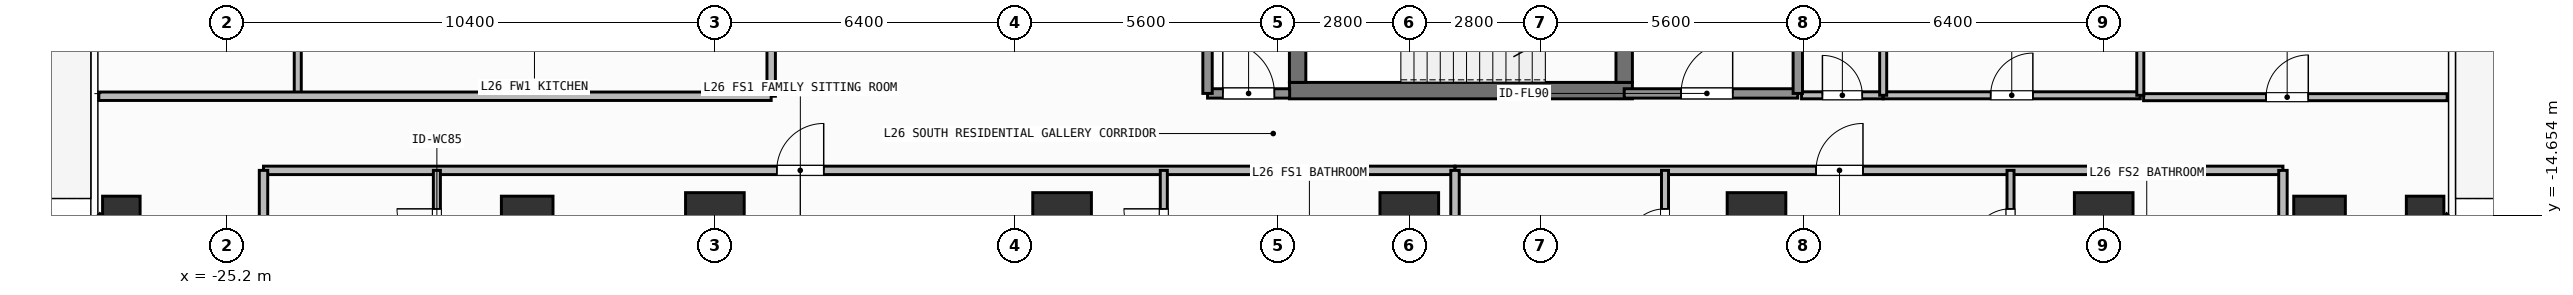
"""IFC4 building model, lengths in metres.
Left out: names, types, materials, properties, quantities, classifications, styles, units other than length and angle.
Written with IfcOpenShell. Run it as: python <this file> out.ifc"""

import sys

from ifc_helpers import new_model, si_unit, direction, frame, frame_2d, origin, origin_2d, place, context, subcontext, project, spatial, rectangle, hollow_rectangle, extrude, element, fill, save


model = new_model("IFC4")
c1 = context("Model", 3, precision=1e-05, world=origin(), true_north=direction((0.0, 1.0)))
c2 = subcontext(c1, "Body", "Model", "MODEL_VIEW")
j1 = project(units=[si_unit("LENGTHUNIT", "METRE"), si_unit("PLANEANGLEUNIT", "RADIAN")], contexts=[c1])
p1 = place(None, origin())
s1 = spatial("IfcSite", under=j1, at=p1, CompositionType="ELEMENT")
p2 = place(p1, origin())
s2 = spatial("IfcBuilding", under=s1, at=p2, CompositionType="ELEMENT")
p3 = place(p2, frame((0.0, 0.0, 104.7)))
s3 = spatial("IfcBuildingStorey", under=s2, at=p3, CompositionType="ELEMENT", Elevation=104.7)
p4 = place(p3, frame((-2.555, -12.0, 0.0), z_axis=(0.0, 0.0, 1.0), x_axis=(1.0, 0.0, 0.0)))
e1 = element("IfcWall", 1, at=p4, inside=s3, PredefinedType="SHEAR", context=c2, shape_type="SweptSolid", body=[
    extrude(rectangle(XDim=7.31, YDim=0.35, at=frame_2d((3.655, 0.0))), origin(), (0.0, 0.0, 1.0), 3.9),
])
p5 = place(p3, frame((-2.38, -11.825, 0.0), z_axis=(0.0, 0.0, 1.0), x_axis=(0.0, 1.0, 0.0)))
e2 = element("IfcWall", 2, at=p5, inside=s3, PredefinedType="SHEAR", context=c2, shape_type="SweptSolid", body=[
    extrude(rectangle(XDim=2.925, YDim=0.35, at=frame_2d((1.462, 0.0))), origin(), (0.0, 0.0, 1.0), 3.9),
])
p6 = place(p3, frame((4.58, -8.9, 0.0), z_axis=(0.0, 0.0, 1.0), x_axis=(0.0, -1.0, 0.0)))
e3 = element("IfcWall", 3, at=p6, inside=s3, PredefinedType="SHEAR", context=c2, shape_type="SweptSolid", body=[
    extrude(rectangle(XDim=2.925, YDim=0.35, at=frame_2d((1.462, 0.0))), origin(), (0.0, 0.0, 1.0), 3.9),
])
p7 = place(p6, frame((0.913, 0.0, 0.0)))
e4 = element("IfcOpeningElement", 4, at=p7, cuts=e3, PredefinedType="OPENING", context=c2, shape_type="SweptSolid", body=[
    extrude(rectangle(XDim=1.1, YDim=2.15, at=frame_2d((0.55, 1.075))), frame((0.0, 0.185, 0.0), z_axis=(0.0, -1.0, 0.0), x_axis=(1.0, 0.0, 0.0)), (0.0, 0.0, 1.0), 0.37),
])
for number, where, z_axis, x_axis in (
    (5, (-14.8, -14.8, 0.0), (0.0, 0.0, 1.0), (1.0, 0.0, 0.0)),
    (6, (-7.4, -14.8, 0.0), (0.0, 0.0, 1.0), (1.0, 0.0, 0.0)),
    (7, (0.0, -14.8, 0.0), (0.0, 0.0, 1.0), (1.0, 0.0, 0.0)),
    (8, (7.4, -14.8, 0.0), (0.0, 0.0, 1.0), (1.0, 0.0, 0.0)),
    (9, (14.8, -14.8, 0.0), (0.0, 0.0, 1.0), (1.0, 0.0, 0.0)),
):
    element("IfcColumn", number, at=place(p3, frame(where, z_axis=z_axis, x_axis=x_axis)), inside=s3, PredefinedType="COLUMN", context=c2, shape_type="SweptSolid", body=[
        extrude(rectangle(XDim=1.25, YDim=1.25, at=origin_2d()), origin(), (0.0, 0.0, 1.0), 3.9),
    ])
for number, where, z_axis, x_axis in (
    (10, (-18.8, -14.8, 0.0), (0.0, 0.0, 1.0), (1.0, 0.0, 0.0)),
    (11, (19.4, -14.8, 0.0), (0.0, 0.0, 1.0), (1.0, 0.0, 0.0)),
):
    element("IfcColumn", number, at=place(p3, frame(where, z_axis=z_axis, x_axis=x_axis)), inside=s3, PredefinedType="COLUMN", context=c2, shape_type="SweptSolid", body=[
        extrude(rectangle(XDim=1.1, YDim=1.1, at=origin_2d()), origin(), (0.0, 0.0, 1.0), 3.9),
    ])
for number, where, z_axis, x_axis in (
    (12, (-27.45, -14.65, 0.0), (0.0, 0.0, 1.0), (1.0, 0.0, 0.0)),
    (13, (21.65, -14.65, 0.0), (0.0, 0.0, 1.0), (1.0, 0.0, 0.0)),
):
    element("IfcColumn", number, at=place(p3, frame(where, z_axis=z_axis, x_axis=x_axis)), inside=s3, PredefinedType="COLUMN", context=c2, shape_type="SweptSolid", body=[
        extrude(hollow_rectangle(XDim=0.8, YDim=0.8, WallThickness=0.036, at=origin_2d()), origin(), (0.0, 0.0, 1.0), 3.9),
    ])
p8 = place(p3, frame((-23.408, -19.292, 0.0), z_axis=(0.0, 0.0, 1.0), x_axis=(-0.707087954376, 0.707125607496, 0.0)))
e14 = element("IfcWall", 14, at=p8, inside=s3, PredefinedType="SOLIDWALL", context=c2, shape_type="SweptSolid", body=[
    extrude(rectangle(XDim=6.484, YDim=0.24, at=frame_2d((3.242, 0.0))), origin(), (0.0, 0.0, 1.0), 3.62),
])
p9 = place(p8, frame((2.492, 0.0, 0.8)))
e15 = element("IfcOpeningElement", 15, at=p9, cuts=e14, PredefinedType="OPENING", context=c2, shape_type="SweptSolid", body=[
    extrude(rectangle(XDim=1.5, YDim=1.85, at=frame_2d((0.75, 0.925))), frame((0.0, 0.13, 0.0), z_axis=(0.0, -1.0, 0.0), x_axis=(1.0, 0.0, 0.0)), (0.0, 0.0, 1.0), 0.26),
])
p10 = place(p3, frame((22.192, -14.708, 0.0), z_axis=(0.0, 0.0, 1.0), x_axis=(-0.707087954376, -0.707125607496, 0.0)))
e16 = element("IfcWall", 16, at=p10, inside=s3, PredefinedType="SOLIDWALL", context=c2, shape_type="SweptSolid", body=[
    extrude(rectangle(XDim=6.484, YDim=0.24, at=frame_2d((3.242, 0.0))), origin(), (0.0, 0.0, 1.0), 3.62),
])
p11 = place(p3, frame((4.58, -12.06, 0.0), z_axis=(0.0, 0.0, 1.0), x_axis=(1.0, 0.0, 0.0)))
e17 = element("IfcWall", 17, at=p11, inside=s3, PredefinedType="SOLIDWALL", context=c2, shape_type="SweptSolid", body=[
    extrude(rectangle(XDim=3.7, YDim=0.2, at=frame_2d((1.85, 0.0))), origin(), (0.0, 0.0, 1.0), 3.62),
])
p12 = place(p11, frame((1.212, 0.0, 0.0)))
e18 = element("IfcOpeningElement", 18, at=p12, cuts=e17, PredefinedType="OPENING", context=c2, shape_type="SweptSolid", body=[
    extrude(rectangle(XDim=1.1, YDim=2.15, at=frame_2d((0.55, 1.075))), frame((0.0, 0.11, 0.0), z_axis=(0.0, -1.0, 0.0), x_axis=(1.0, 0.0, 0.0)), (0.0, 0.0, 1.0), 0.22),
])
p13 = place(p3, frame((-4.3, -12.06, 0.0), z_axis=(0.0, 0.0, 1.0), x_axis=(1.0, 0.0, 0.0)))
e19 = element("IfcWall", 19, at=p13, inside=s3, PredefinedType="SOLIDWALL", context=c2, shape_type="SweptSolid", body=[
    extrude(rectangle(XDim=1.75, YDim=0.2, at=frame_2d((0.875, 0.0))), origin(), (0.0, 0.0, 1.0), 3.62),
])
p14 = place(p13, frame((0.325, 0.0, 0.0)))
e20 = element("IfcOpeningElement", 20, at=p14, cuts=e19, PredefinedType="OPENING", context=c2, shape_type="SweptSolid", body=[
    extrude(rectangle(XDim=1.1, YDim=2.15, at=frame_2d((0.55, 1.075))), frame((0.0, 0.11, 0.0), z_axis=(0.0, -1.0, 0.0), x_axis=(1.0, 0.0, 0.0)), (0.0, 0.0, 1.0), 0.22),
])
p15 = place(p3, frame((8.36, -12.1, 0.0), z_axis=(0.0, 0.0, 1.0), x_axis=(1.0, 0.0, 0.0)))
e21 = element("IfcWall", 21, at=p15, inside=s3, PredefinedType="PARTITIONING", context=c2, shape_type="SweptSolid", body=[
    extrude(rectangle(XDim=1.74, YDim=0.15, at=frame_2d((0.87, 0.0))), origin(), (0.0, 0.0, 1.0), 3.62),
])
p16 = place(p15, frame((0.445, 0.0, 0.0)))
e22 = element("IfcOpeningElement", 22, at=p16, cuts=e21, PredefinedType="OPENING", context=c2, shape_type="SweptSolid", body=[
    extrude(rectangle(XDim=0.85, YDim=2.1, at=frame_2d((0.425, 1.05))), frame((0.0, 0.085, 0.0), z_axis=(0.0, -1.0, 0.0), x_axis=(1.0, 0.0, 0.0)), (0.0, 0.0, 1.0), 0.17),
])
p17 = place(p3, frame((10.1, -12.1, 0.0), z_axis=(0.0, 0.0, 1.0), x_axis=(1.0, 0.0, 0.0)))
e23 = element("IfcWall", 23, at=p17, inside=s3, PredefinedType="PARTITIONING", context=c2, shape_type="SweptSolid", body=[
    extrude(rectangle(XDim=5.48, YDim=0.15, at=frame_2d((2.74, 0.0))), origin(), (0.0, 0.0, 1.0), 3.62),
])
p18 = place(p17, frame((2.29, 0.0, 0.0)))
e24 = element("IfcOpeningElement", 24, at=p18, cuts=e23, PredefinedType="OPENING", context=c2, shape_type="SweptSolid", body=[
    extrude(rectangle(XDim=0.9, YDim=2.1, at=frame_2d((0.45, 1.05))), frame((0.0, 0.085, 0.0), z_axis=(0.0, -1.0, 0.0), x_axis=(1.0, 0.0, 0.0)), (0.0, 0.0, 1.0), 0.17),
])
p19 = place(p3, frame((-24.42, -13.7, 0.0), z_axis=(0.0, 0.0, 1.0), x_axis=(1.0, 0.0, 0.0)))
e25 = element("IfcWall", 25, at=p19, inside=s3, PredefinedType="PARTITIONING", context=c2, shape_type="SweptSolid", body=[
    extrude(rectangle(XDim=25.394, YDim=0.18, at=frame_2d((12.697, 0.0))), origin(), (0.0, 0.0, 1.0), 3.62),
])
p20 = place(p19, frame((10.939, 0.0, 0.0)))
e26 = element("IfcOpeningElement", 26, at=p20, cuts=e25, PredefinedType="OPENING", context=c2, shape_type="SweptSolid", body=[
    extrude(rectangle(XDim=1.0, YDim=2.2, at=frame_2d((0.5, 1.1))), frame((0.0, 0.1, 0.0), z_axis=(0.0, -1.0, 0.0), x_axis=(1.0, 0.0, 0.0)), (0.0, 0.0, 1.0), 0.2),
])
p21 = place(p3, frame((-20.725, -16.19, 0.0), z_axis=(0.0, 0.0, 1.0), x_axis=(0.0, 1.0, 0.0)))
e27 = element("IfcWall", 27, at=p21, inside=s3, PredefinedType="PARTITIONING", context=c2, shape_type="SweptSolid", body=[
    extrude(rectangle(XDim=2.49, YDim=0.15, at=frame_2d((1.245, 0.0))), origin(), (0.0, 0.0, 1.0), 3.62),
])
p22 = place(p21, frame((0.82, 0.0, 0.0)))
e28 = element("IfcOpeningElement", 28, at=p22, cuts=e27, PredefinedType="OPENING", context=c2, shape_type="SweptSolid", body=[
    extrude(rectangle(XDim=0.85, YDim=2.1, at=frame_2d((0.425, 1.05))), frame((0.0, 0.085, 0.0), z_axis=(0.0, -1.0, 0.0), x_axis=(1.0, 0.0, 0.0)), (0.0, 0.0, 1.0), 0.17),
])
p23 = place(p3, frame((-5.232, -16.19, 0.0), z_axis=(0.0, 0.0, 1.0), x_axis=(0.0, 1.0, 0.0)))
e29 = element("IfcWall", 29, at=p23, inside=s3, PredefinedType="PARTITIONING", context=c2, shape_type="SweptSolid", body=[
    extrude(rectangle(XDim=2.49, YDim=0.15, at=frame_2d((1.245, 0.0))), origin(), (0.0, 0.0, 1.0), 3.62),
])
p24 = place(p23, frame((0.82, 0.0, 0.0)))
e30 = element("IfcOpeningElement", 30, at=p24, cuts=e29, PredefinedType="OPENING", context=c2, shape_type="SweptSolid", body=[
    extrude(rectangle(XDim=0.85, YDim=2.1, at=frame_2d((0.425, 1.05))), frame((0.0, 0.085, 0.0), z_axis=(0.0, -1.0, 0.0), x_axis=(1.0, 0.0, 0.0)), (0.0, 0.0, 1.0), 0.17),
])
p25 = place(p3, frame((0.974, -13.7, 0.0), z_axis=(0.0, 0.0, 1.0), x_axis=(1.0, 0.0, 0.0)))
e31 = element("IfcWall", 31, at=p25, inside=s3, PredefinedType="PARTITIONING", context=c2, shape_type="SweptSolid", body=[
    extrude(rectangle(XDim=17.646, YDim=0.18, at=frame_2d((8.823, 0.0))), origin(), (0.0, 0.0, 1.0), 3.62),
])
p26 = place(p25, frame((7.695, 0.0, 0.0)))
e32 = element("IfcOpeningElement", 32, at=p26, cuts=e31, PredefinedType="OPENING", context=c2, shape_type="SweptSolid", body=[
    extrude(rectangle(XDim=1.0, YDim=2.2, at=frame_2d((0.5, 1.1))), frame((0.0, 0.1, 0.0), z_axis=(0.0, -1.0, 0.0), x_axis=(1.0, 0.0, 0.0)), (0.0, 0.0, 1.0), 0.2),
])
p27 = place(p3, frame((5.45, -16.19, 0.0), z_axis=(0.0, 0.0, 1.0), x_axis=(0.0, 1.0, 0.0)))
e33 = element("IfcWall", 33, at=p27, inside=s3, PredefinedType="PARTITIONING", context=c2, shape_type="SweptSolid", body=[
    extrude(rectangle(XDim=2.49, YDim=0.15, at=frame_2d((1.245, 0.0))), origin(), (0.0, 0.0, 1.0), 3.62),
])
p28 = place(p27, frame((0.82, 0.0, 0.0)))
e34 = element("IfcOpeningElement", 34, at=p28, cuts=e33, PredefinedType="OPENING", context=c2, shape_type="SweptSolid", body=[
    extrude(rectangle(XDim=0.85, YDim=2.1, at=frame_2d((0.425, 1.05))), frame((0.0, 0.085, 0.0), z_axis=(0.0, -1.0, 0.0), x_axis=(1.0, 0.0, 0.0)), (0.0, 0.0, 1.0), 0.17),
])
p29 = place(p3, frame((12.814, -16.19, 0.0), z_axis=(0.0, 0.0, 1.0), x_axis=(0.0, 1.0, 0.0)))
e35 = element("IfcWall", 35, at=p29, inside=s3, PredefinedType="PARTITIONING", context=c2, shape_type="SweptSolid", body=[
    extrude(rectangle(XDim=2.49, YDim=0.15, at=frame_2d((1.245, 0.0))), origin(), (0.0, 0.0, 1.0), 3.62),
])
p30 = place(p29, frame((0.82, 0.0, 0.0)))
e36 = element("IfcOpeningElement", 36, at=p30, cuts=e35, PredefinedType="OPENING", context=c2, shape_type="SweptSolid", body=[
    extrude(rectangle(XDim=0.85, YDim=2.1, at=frame_2d((0.425, 1.05))), frame((0.0, 0.085, 0.0), z_axis=(0.0, -1.0, 0.0), x_axis=(1.0, 0.0, 0.0)), (0.0, 0.0, 1.0), 0.17),
])
p31 = place(p3, frame((-13.6, -12.12, 0.0), z_axis=(0.0, 0.0, 1.0), x_axis=(0.0, 1.0, 0.0)))
e37 = element("IfcWall", 37, at=p31, inside=s3, PredefinedType="PARTITIONING", context=c2, shape_type="SweptSolid", body=[
    extrude(rectangle(XDim=10.52, YDim=0.18, at=frame_2d((5.26, 0.0))), origin(), (0.0, 0.0, 1.0), 3.62),
])
p32 = place(p31, frame((5.468, 0.0, 0.0)))
e38 = element("IfcOpeningElement", 38, at=p32, cuts=e37, PredefinedType="OPENING", context=c2, shape_type="SweptSolid", body=[
    extrude(rectangle(XDim=1.0, YDim=2.2, at=frame_2d((0.5, 1.1))), frame((0.0, 0.1, 0.0), z_axis=(0.0, -1.0, 0.0), x_axis=(1.0, 0.0, 0.0)), (0.0, 0.0, 1.0), 0.2),
])
p33 = place(p3, frame((15.65, -12.14, 0.0), z_axis=(0.0, 0.0, 1.0), x_axis=(1.0, 0.0, 0.0)))
e39 = element("IfcWall", 39, at=p33, inside=s3, PredefinedType="PARTITIONING", context=c2, shape_type="SweptSolid", body=[
    extrude(rectangle(XDim=6.47, YDim=0.15, at=frame_2d((3.235, 0.0))), origin(), (0.0, 0.0, 1.0), 3.62),
])
p34 = place(p33, frame((2.61, 0.0, 0.0)))
e40 = element("IfcOpeningElement", 40, at=p34, cuts=e39, PredefinedType="OPENING", context=c2, shape_type="SweptSolid", body=[
    extrude(rectangle(XDim=0.9, YDim=2.1, at=frame_2d((0.45, 1.05))), frame((0.0, 0.085, 0.0), z_axis=(0.0, -1.0, 0.0), x_axis=(1.0, 0.0, 0.0)), (0.0, 0.0, 1.0), 0.17),
])
for number, where, z_axis, x_axis in (
    (41, (8.28, -12.06, 0.0), (0.0, 0.0, 1.0), (0.0, 1.0, 0.0)),
    (42, (-4.3, -12.06, 0.0), (0.0, 0.0, 1.0), (0.0, 1.0, 0.0)),
):
    element("IfcWall", number, at=place(p3, frame(where, z_axis=z_axis, x_axis=x_axis)), inside=s3, PredefinedType="SOLIDWALL", context=c2, shape_type="SweptSolid", body=[
        extrude(rectangle(XDim=3.185, YDim=0.2, at=frame_2d((1.593, 0.0))), origin(), (0.0, 0.0, 1.0), 3.62),
    ])
p35 = place(p3, frame((10.1, -12.1, 0.0), z_axis=(0.0, 0.0, 1.0), x_axis=(0.0, 1.0, 0.0)))
e43 = element("IfcWall", 43, at=p35, inside=s3, PredefinedType="PARTITIONING", context=c2, shape_type="SweptSolid", body=[
    extrude(rectangle(XDim=2.35, YDim=0.15, at=frame_2d((1.175, 0.0))), origin(), (0.0, 0.0, 1.0), 3.62),
])
p36 = place(p3, frame((15.58, -12.1, 0.0), z_axis=(0.0, 0.0, 1.0), x_axis=(0.0, 1.0, 0.0)))
e44 = element("IfcWall", 44, at=p36, inside=s3, PredefinedType="PARTITIONING", context=c2, shape_type="SweptSolid", body=[
    extrude(rectangle(XDim=6.25, YDim=0.15, at=frame_2d((3.125, 0.0))), origin(), (0.0, 0.0, 1.0), 3.62),
])
for number, where, z_axis, x_axis in (
    (45, (-24.42, -18.11, 0.0), (0.0, 0.0, 1.0), (0.0, 1.0, 0.0)),
    (46, (18.62, -18.11, 0.0), (0.0, 0.0, 1.0), (0.0, 1.0, 0.0)),
):
    element("IfcWall", number, at=place(p3, frame(where, z_axis=z_axis, x_axis=x_axis)), inside=s3, PredefinedType="PARTITIONING", context=c2, shape_type="SweptSolid", body=[
        extrude(rectangle(XDim=4.41, YDim=0.18, at=frame_2d((2.205, 0.0))), origin(), (0.0, 0.0, 1.0), 3.62),
    ])
p37 = place(p3, frame((0.974, -19.23, 0.0), z_axis=(0.0, 0.0, 1.0), x_axis=(0.0, 1.0, 0.0)))
e47 = element("IfcWall", 47, at=p37, inside=s3, PredefinedType="PARTITIONING", context=c2, shape_type="SweptSolid", body=[
    extrude(rectangle(XDim=5.53, YDim=0.18, at=frame_2d((2.765, 0.0))), origin(), (0.0, 0.0, 1.0), 3.62),
])
p38 = place(p3, frame((-23.69, -12.12, 0.0), z_axis=(0.0, 0.0, 1.0), x_axis=(0.0, 1.0, 0.0)))
e48 = element("IfcWall", 48, at=p38, inside=s3, PredefinedType="PARTITIONING", context=c2, shape_type="SweptSolid", body=[
    extrude(rectangle(XDim=2.8, YDim=0.15, at=frame_2d((1.4, 0.0))), origin(), (0.0, 0.0, 1.0), 3.62),
])
p39 = place(p3, frame((-27.93, -12.12, 0.0), z_axis=(0.0, 0.0, 1.0), x_axis=(1.0, 0.0, 0.0)))
e49 = element("IfcWall", 49, at=p39, inside=s3, PredefinedType="PARTITIONING", context=c2, shape_type="SweptSolid", body=[
    extrude(rectangle(XDim=14.33, YDim=0.18, at=frame_2d((7.165, 0.0))), origin(), (0.0, 0.0, 1.0), 3.62),
])
p40 = place(p12, origin())
e50 = element("IfcDoor", 50, at=p40, inside=s3, OperationType="SINGLE_SWING_RIGHT", PredefinedType="DOOR", context=c2, shape_type="SweptSolid", body=[
    extrude(rectangle(XDim=1.1, YDim=2.15, at=frame_2d((0.55, 1.075))), frame((0.0, 0.025, 0.0), z_axis=(0.0, -1.0, 0.0), x_axis=(1.0, 0.0, 0.0)), (0.0, 0.0, 1.0), 0.05),
])
fill(e18, e50)
p41 = place(p14, origin())
e51 = element("IfcDoor", 51, at=p41, inside=s3, OperationType="SINGLE_SWING_LEFT", PredefinedType="DOOR", context=c2, shape_type="SweptSolid", body=[
    extrude(rectangle(XDim=1.1, YDim=2.15, at=frame_2d((0.55, 1.075))), frame((0.0, 0.025, 0.0), z_axis=(0.0, -1.0, 0.0), x_axis=(1.0, 0.0, 0.0)), (0.0, 0.0, 1.0), 0.05),
])
fill(e20, e51)
p42 = place(p16, origin())
e52 = element("IfcDoor", 52, at=p42, inside=s3, OperationType="SINGLE_SWING_LEFT", PredefinedType="DOOR", context=c2, shape_type="SweptSolid", body=[
    extrude(rectangle(XDim=0.85, YDim=2.1, at=frame_2d((0.425, 1.05))), frame((0.0, 0.025, 0.0), z_axis=(0.0, -1.0, 0.0), x_axis=(1.0, 0.0, 0.0)), (0.0, 0.0, 1.0), 0.05),
])
fill(e22, e52)
p43 = place(p18, origin())
e53 = element("IfcDoor", 53, at=p43, inside=s3, OperationType="SINGLE_SWING_RIGHT", PredefinedType="DOOR", context=c2, shape_type="SweptSolid", body=[
    extrude(rectangle(XDim=0.9, YDim=2.1, at=frame_2d((0.45, 1.05))), frame((0.0, 0.025, 0.0), z_axis=(0.0, -1.0, 0.0), x_axis=(1.0, 0.0, 0.0)), (0.0, 0.0, 1.0), 0.05),
])
fill(e24, e53)
p44 = place(p20, origin())
e54 = element("IfcDoor", 54, at=p44, inside=s3, OperationType="SINGLE_SWING_RIGHT", PredefinedType="DOOR", context=c2, shape_type="SweptSolid", body=[
    extrude(rectangle(XDim=1.0, YDim=2.2, at=frame_2d((0.5, 1.1))), frame((0.0, 0.025, 0.0), z_axis=(0.0, -1.0, 0.0), x_axis=(1.0, 0.0, 0.0)), (0.0, 0.0, 1.0), 0.05),
])
fill(e26, e54)
p45 = place(p22, origin())
e55 = element("IfcDoor", 55, at=p45, inside=s3, OperationType="SINGLE_SWING_RIGHT", PredefinedType="DOOR", context=c2, shape_type="SweptSolid", body=[
    extrude(rectangle(XDim=0.85, YDim=2.1, at=frame_2d((0.425, 1.05))), frame((0.0, 0.025, 0.0), z_axis=(0.0, -1.0, 0.0), x_axis=(1.0, 0.0, 0.0)), (0.0, 0.0, 1.0), 0.05),
])
fill(e28, e55)
p46 = place(p24, origin())
e56 = element("IfcDoor", 56, at=p46, inside=s3, OperationType="SINGLE_SWING_RIGHT", PredefinedType="DOOR", context=c2, shape_type="SweptSolid", body=[
    extrude(rectangle(XDim=0.85, YDim=2.1, at=frame_2d((0.425, 1.05))), frame((0.0, 0.025, 0.0), z_axis=(0.0, -1.0, 0.0), x_axis=(1.0, 0.0, 0.0)), (0.0, 0.0, 1.0), 0.05),
])
fill(e30, e56)
p47 = place(p26, origin())
e57 = element("IfcDoor", 57, at=p47, inside=s3, OperationType="SINGLE_SWING_RIGHT", PredefinedType="DOOR", context=c2, shape_type="SweptSolid", body=[
    extrude(rectangle(XDim=1.0, YDim=2.2, at=frame_2d((0.5, 1.1))), frame((0.0, 0.025, 0.0), z_axis=(0.0, -1.0, 0.0), x_axis=(1.0, 0.0, 0.0)), (0.0, 0.0, 1.0), 0.05),
])
fill(e32, e57)
p48 = place(p28, origin())
e58 = element("IfcDoor", 58, at=p48, inside=s3, OperationType="SINGLE_SWING_LEFT", PredefinedType="DOOR", context=c2, shape_type="SweptSolid", body=[
    extrude(rectangle(XDim=0.85, YDim=2.1, at=frame_2d((0.425, 1.05))), frame((0.0, 0.025, 0.0), z_axis=(0.0, -1.0, 0.0), x_axis=(1.0, 0.0, 0.0)), (0.0, 0.0, 1.0), 0.05),
])
fill(e34, e58)
p49 = place(p30, origin())
e59 = element("IfcDoor", 59, at=p49, inside=s3, OperationType="SINGLE_SWING_LEFT", PredefinedType="DOOR", context=c2, shape_type="SweptSolid", body=[
    extrude(rectangle(XDim=0.85, YDim=2.1, at=frame_2d((0.425, 1.05))), frame((0.0, 0.025, 0.0), z_axis=(0.0, -1.0, 0.0), x_axis=(1.0, 0.0, 0.0)), (0.0, 0.0, 1.0), 0.05),
])
fill(e36, e59)
p50 = place(p34, origin())
e60 = element("IfcDoor", 60, at=p50, inside=s3, OperationType="SINGLE_SWING_RIGHT", PredefinedType="DOOR", context=c2, shape_type="SweptSolid", body=[
    extrude(rectangle(XDim=0.9, YDim=2.1, at=frame_2d((0.45, 1.05))), frame((0.0, 0.025, 0.0), z_axis=(0.0, -1.0, 0.0), x_axis=(1.0, 0.0, 0.0)), (0.0, 0.0, 1.0), 0.05),
])
fill(e40, e60)
save(model, sys.argv[1])
